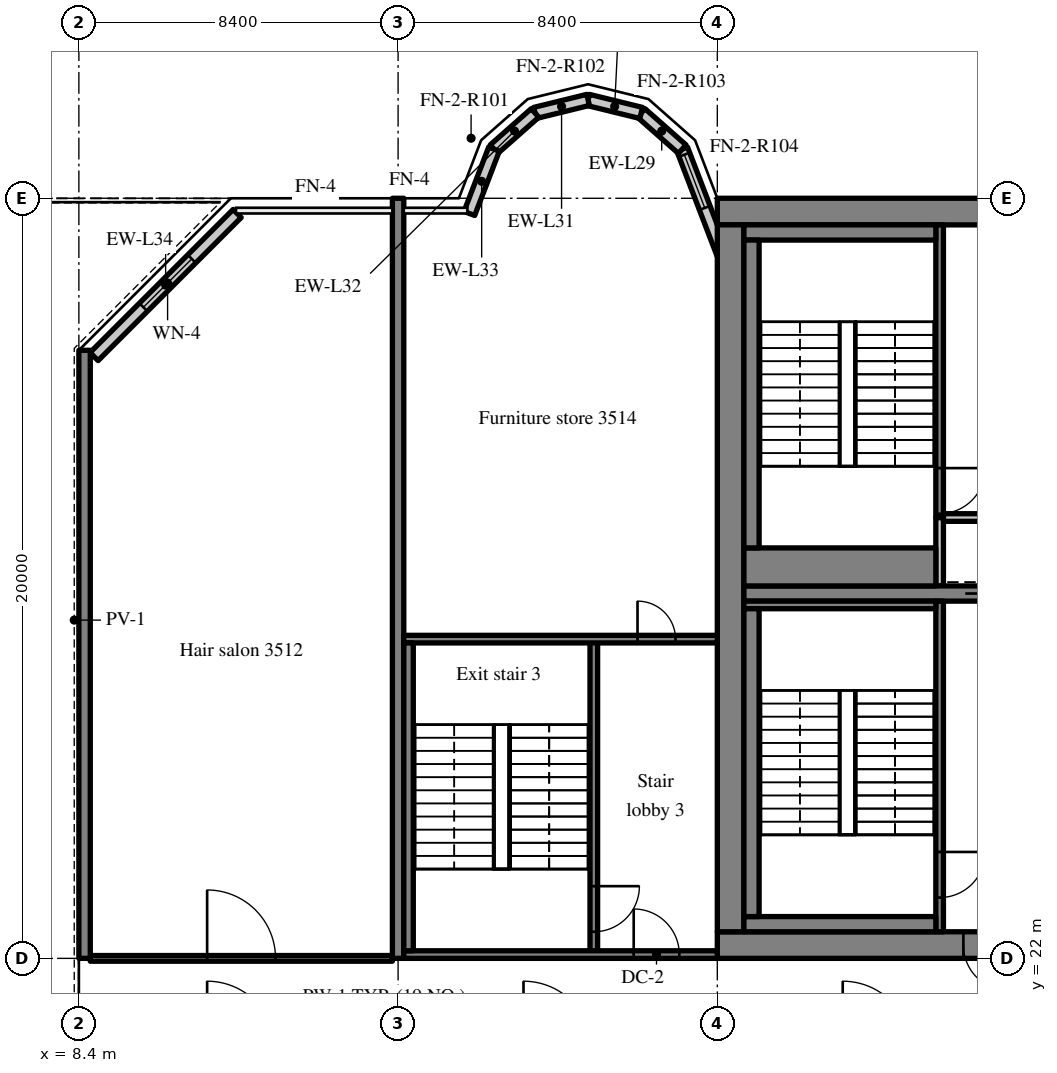
"""IFC4 building model, lengths in metres.
Left out: names, types, materials, properties, quantities, classifications, styles, units other than length and angle.
Written with IfcOpenShell. Run it as: python <this file> out.ifc"""

import sys

from ifc_helpers import new_model, si_unit, direction, frame, frame_2d, origin, place, context, subcontext, project, spatial, rectangle, extrude, source, transform, mapped, element, fill, save


model = new_model("IFC4")
c1 = context("Model", 3, precision=1e-05, world=origin(), true_north=direction((0.0, 1.0)))
c2 = subcontext(c1, "Body", "Model", "MODEL_VIEW")
j1 = project(units=[si_unit("LENGTHUNIT", "METRE"), si_unit("PLANEANGLEUNIT", "RADIAN")], contexts=[c1])
p1 = place(None, origin())
s1 = spatial("IfcSite", under=j1, at=p1, CompositionType="ELEMENT")
p2 = place(p1, origin())
s2 = spatial("IfcBuilding", under=s1, at=p2, CompositionType="ELEMENT")
p3 = place(p2, frame((0.0, 0.0, 146.2)))
s3 = spatial("IfcBuildingStorey", under=s2, at=p3, CompositionType="ELEMENT", Elevation=146.2)
m1 = source(origin(), c2, "Body", "SweptSolid", [
    extrude(rectangle(XDim=50.4, YDim=0.7, at=frame_2d((25.2, 0.0))), origin(), (0.0, 0.0, 1.0), 5.12),
])
p4 = place(p3, frame((25.2, 22.35, 0.0), z_axis=(0.0, 0.0, 1.0), x_axis=(1.0, 0.0, 0.0)))
e1 = element("IfcWall", 1, at=p4, inside=s3, PredefinedType="SHEAR", context=c2, shape_type="MappedRepresentation", body=[
    mapped(m1, transform((0.0, 0.0, 0.0), scale=1.0)),
])
m2 = source(origin(), c2, "Body", "SweptSolid", [
    extrude(rectangle(XDim=1.8, YDim=2.1, at=frame_2d((0.9, 1.05))), frame((0.0, 0.36, 0.0), z_axis=(0.0, -1.0, 0.0), x_axis=(1.0, 0.0, 0.0)), (0.0, 0.0, 1.0), 0.72),
])
p5 = place(p4, frame((15.9, 0.0, 0.0)))
e2 = element("IfcOpeningElement", 2, at=p5, cuts=e1, PredefinedType="OPENING", context=c2, shape_type="MappedRepresentation", body=[
    mapped(m2, transform((0.0, 0.0, 0.0), scale=1.0)),
])
p6 = place(p4, frame((32.7, 0.0, 0.0)))
e3 = element("IfcOpeningElement", 3, at=p6, cuts=e1, PredefinedType="OPENING", context=c2, shape_type="MappedRepresentation", body=[
    mapped(m2, transform((0.0, 0.0, 0.0), scale=1.0)),
])
m3 = source(origin(), c2, "Body", "SweptSolid", [
    extrude(rectangle(XDim=1.2, YDim=2.1, at=frame_2d((0.6, 1.05))), frame((0.0, 0.36, 0.0), z_axis=(0.0, -1.0, 0.0), x_axis=(1.0, 0.0, 0.0)), (0.0, 0.0, 1.0), 0.72),
])
p7 = place(p4, frame((6.475, 0.0, 0.0)))
e4 = element("IfcOpeningElement", 4, at=p7, cuts=e1, PredefinedType="OPENING", context=c2, shape_type="MappedRepresentation", body=[
    mapped(m3, transform((0.0, 0.0, 0.0), scale=1.0)),
])
p8 = place(p4, frame((47.875, 0.0, 0.0)))
e5 = element("IfcOpeningElement", 5, at=p8, cuts=e1, PredefinedType="OPENING", context=c2, shape_type="MappedRepresentation", body=[
    mapped(m3, transform((0.0, 0.0, 0.0), scale=1.0)),
])
p9 = place(p3, frame((25.2, 41.65, 0.0), z_axis=(0.0, 0.0, 1.0), x_axis=(1.0, 0.0, 0.0)))
e6 = element("IfcWall", 6, at=p9, inside=s3, PredefinedType="SHEAR", context=c2, shape_type="MappedRepresentation", body=[
    mapped(m1, transform((0.0, 0.0, 0.0), scale=1.0)),
])
m4 = source(origin(), c2, "Body", "SweptSolid", [
    extrude(rectangle(XDim=18.6, YDim=0.7, at=frame_2d((9.3, 0.0))), origin(), (0.0, 0.0, 1.0), 5.12),
])
p10 = place(p3, frame((25.55, 22.7, 0.0), z_axis=(0.0, 0.0, 1.0), x_axis=(0.0, 1.0, 0.0)))
e7 = element("IfcWall", 7, at=p10, inside=s3, PredefinedType="SHEAR", context=c2, shape_type="MappedRepresentation", body=[
    mapped(m4, transform((0.0, 0.0, 0.0), scale=1.0)),
])
m5 = source(origin(), c2, "Body", "SweptSolid", [
    extrude(rectangle(XDim=7.5, YDim=0.4, at=frame_2d((3.75, 0.0))), origin(), (0.0, 0.0, 1.0), 5.12),
])
p11 = place(p3, frame((25.9, 31.6, 0.0), z_axis=(0.0, 0.0, 1.0), x_axis=(1.0, 0.0, 0.0)))
e8 = element("IfcWall", 8, at=p11, inside=s3, PredefinedType="SHEAR", context=c2, shape_type="MappedRepresentation", body=[
    mapped(m5, transform((0.0, 0.0, 0.0), scale=1.0)),
])
m6 = source(origin(), c2, "Body", "SweptSolid", [
    extrude(rectangle(XDim=1.1, YDim=2.1, at=frame_2d((0.55, 1.05))), frame((0.0, 0.21, 0.0), z_axis=(0.0, -1.0, 0.0), x_axis=(1.0, 0.0, 0.0)), (0.0, 0.0, 1.0), 0.42),
])
p12 = place(p11, frame((5.825, 0.0, 0.0)))
e9 = element("IfcOpeningElement", 9, at=p12, cuts=e8, PredefinedType="OPENING", context=c2, shape_type="MappedRepresentation", body=[
    mapped(m6, transform((0.0, 0.0, 0.0), scale=1.0)),
])
m7 = source(origin(), c2, "Body", "SweptSolid", [
    extrude(rectangle(XDim=16.0, YDim=0.3, at=frame_2d((8.0, 0.0))), origin(), (0.0, 0.0, 1.0), 5.12),
])
p13 = place(p3, frame((8.55, 22.0, 0.0), z_axis=(0.0, 0.0, 1.0), x_axis=(0.0, 1.0, 0.0)))
e10 = element("IfcWall", 10, at=p13, inside=s3, PredefinedType="SHEAR", context=c2, shape_type="MappedRepresentation", body=[
    mapped(m7, transform((0.0, 0.0, 0.0), scale=1.0)),
])
m8 = source(origin(), c2, "Body", "SweptSolid", [
    extrude(rectangle(XDim=20.0, YDim=0.3, at=frame_2d((10.0, 0.0))), origin(), (0.0, 0.0, 1.0), 5.12),
])
p14 = place(p3, frame((16.8, 22.0, 0.0), z_axis=(0.0, 0.0, 1.0), x_axis=(0.0, 1.0, 0.0)))
e11 = element("IfcWall", 11, at=p14, inside=s3, PredefinedType="SHEAR", context=c2, shape_type="MappedRepresentation", body=[
    mapped(m8, transform((0.0, 0.0, 0.0), scale=1.0)),
])
m9 = source(origin(), c2, "Body", "SweptSolid", [
    extrude(rectangle(XDim=3.559, YDim=0.3, at=frame_2d((1.78, 0.0))), origin(), (0.0, 0.0, 1.0), 5.12),
])
p15 = place(p3, frame((25.55, 39.969, 0.0), z_axis=(0.0, 0.0, 1.0), x_axis=(-0.35779745313, 0.933799219604, 0.0)))
e12 = element("IfcWall", 12, at=p15, inside=s3, PredefinedType="SOLIDWALL", context=c2, shape_type="MappedRepresentation", body=[
    mapped(m9, transform((0.0, 0.0, 0.0), scale=1.0)),
])
m10 = source(origin(), c2, "Body", "SweptSolid", [
    extrude(rectangle(XDim=1.5, YDim=2.0, at=frame_2d((0.75, 1.0))), frame((0.0, 0.16, 0.0), z_axis=(0.0, -1.0, 0.0), x_axis=(1.0, 0.0, 0.0)), (0.0, 0.0, 1.0), 0.32),
])
p16 = place(p15, frame((1.903, 0.0, 0.9)))
e13 = element("IfcOpeningElement", 13, at=p16, cuts=e12, PredefinedType="OPENING", context=c2, shape_type="MappedRepresentation", body=[
    mapped(m10, transform((0.0, 0.0, 0.0), scale=1.0)),
])
m11 = source(origin(), c2, "Body", "SweptSolid", [
    extrude(rectangle(XDim=1.44, YDim=0.3, at=frame_2d((0.72, 0.0))), origin(), (0.0, 0.0, 1.0), 5.12),
])
p17 = place(p3, frame((24.277, 43.292, 0.0), z_axis=(0.0, 0.0, 1.0), x_axis=(-0.749649827867, 0.661834673902, 0.0)))
e14 = element("IfcWall", 14, at=p17, inside=s3, PredefinedType="SOLIDWALL", context=c2, shape_type="MappedRepresentation", body=[
    mapped(m11, transform((0.0, 0.0, 0.0), scale=1.0)),
])
m12 = source(origin(), c2, "Body", "SweptSolid", [
    extrude(rectangle(XDim=1.438, YDim=0.3, at=frame_2d((0.719, 0.0))), origin(), (0.0, 0.0, 1.0), 5.12),
])
p18 = place(p3, frame((23.197, 44.245, 0.0), z_axis=(0.0, 0.0, 1.0), x_axis=(-0.971152283879, 0.238460146601, 0.0)))
e15 = element("IfcWall", 15, at=p18, inside=s3, PredefinedType="SOLIDWALL", context=c2, shape_type="MappedRepresentation", body=[
    mapped(m12, transform((0.0, 0.0, 0.0), scale=1.0)),
])
m13 = source(origin(), c2, "Body", "SweptSolid", [
    extrude(rectangle(XDim=1.439, YDim=0.3, at=frame_2d((0.719, 0.0))), origin(), (0.0, 0.0, 1.0), 5.12),
])
p19 = place(p3, frame((21.8, 44.588, 0.0), z_axis=(0.0, 0.0, 1.0), x_axis=(-0.971161932466, -0.238420848351, 0.0)))
e16 = element("IfcWall", 16, at=p19, inside=s3, PredefinedType="SOLIDWALL", context=c2, shape_type="MappedRepresentation", body=[
    mapped(m13, transform((0.0, 0.0, 0.0), scale=1.0)),
])
m14 = source(origin(), c2, "Body", "SweptSolid", [
    extrude(rectangle(XDim=1.44, YDim=0.3, at=frame_2d((0.72, 0.0))), origin(), (0.0, 0.0, 1.0), 5.12),
])
p20 = place(p3, frame((20.403, 44.245, 0.0), z_axis=(0.0, 0.0, 1.0), x_axis=(-0.74957555648, -0.661918790432, 0.0)))
e17 = element("IfcWall", 17, at=p20, inside=s3, PredefinedType="SOLIDWALL", context=c2, shape_type="MappedRepresentation", body=[
    mapped(m14, transform((0.0, 0.0, 0.0), scale=1.0)),
])
m15 = source(origin(), c2, "Body", "SweptSolid", [
    extrude(rectangle(XDim=1.812, YDim=0.3, at=frame_2d((0.906, 0.0))), origin(), (0.0, 0.0, 1.0), 5.12),
])
p21 = place(p3, frame((19.323, 43.292, 0.0), z_axis=(0.0, 0.0, 1.0), x_axis=(-0.357877270961, -0.93376863244, 0.0)))
e18 = element("IfcWall", 18, at=p21, inside=s3, PredefinedType="SOLIDWALL", context=c2, shape_type="MappedRepresentation", body=[
    mapped(m15, transform((0.0, 0.0, 0.0), scale=1.0)),
])
m16 = source(origin(), c2, "Body", "SweptSolid", [
    extrude(rectangle(XDim=5.326, YDim=0.3, at=frame_2d((2.663, 0.0))), origin(), (0.0, 0.0, 1.0), 5.12),
])
p22 = place(p3, frame((12.566, 41.6, 0.0), z_axis=(0.0, 0.0, 1.0), x_axis=(-0.707083859269, -0.707129702361, 0.0)))
e19 = element("IfcWall", 19, at=p22, inside=s3, PredefinedType="SOLIDWALL", context=c2, shape_type="MappedRepresentation", body=[
    mapped(m16, transform((0.0, 0.0, 0.0), scale=1.0)),
])
m17 = source(origin(), c2, "Body", "SweptSolid", [
    extrude(rectangle(XDim=1.8, YDim=1.5, at=frame_2d((0.9, 0.75))), frame((0.0, 0.16, 0.0), z_axis=(0.0, -1.0, 0.0), x_axis=(1.0, 0.0, 0.0)), (0.0, 0.0, 1.0), 0.32),
])
p23 = place(p22, frame((1.689, 0.0, 0.9)))
e20 = element("IfcOpeningElement", 20, at=p23, cuts=e19, PredefinedType="OPENING", context=c2, shape_type="MappedRepresentation", body=[
    mapped(m17, transform((0.0, 0.0, 0.0), scale=1.0)),
])
m18 = source(origin(), c2, "Body", "SweptSolid", [
    extrude(rectangle(XDim=8.7, YDim=0.2, at=frame_2d((4.35, 0.0))), origin(), (0.0, 0.0, 1.0), 5.12),
])
p24 = place(p3, frame((31.05, 22.7, 0.0), z_axis=(0.0, 0.0, 1.0), x_axis=(0.0, 1.0, 0.0)))
e21 = element("IfcWall", 21, at=p24, inside=s3, PredefinedType="SOLIDWALL", context=c2, shape_type="MappedRepresentation", body=[
    mapped(m18, transform((0.0, 0.0, 0.0), scale=1.0)),
])
m19 = source(origin(), c2, "Body", "SweptSolid", [
    extrude(rectangle(XDim=1.2, YDim=2.1, at=frame_2d((0.6, 1.05))), frame((0.0, 0.11, 0.0), z_axis=(0.0, -1.0, 0.0), x_axis=(1.0, 0.0, 0.0)), (0.0, 0.0, 1.0), 0.22),
])
p25 = place(p24, frame((0.9, 0.0, 0.0)))
e22 = element("IfcOpeningElement", 22, at=p25, cuts=e21, PredefinedType="OPENING", context=c2, shape_type="MappedRepresentation", body=[
    mapped(m19, transform((0.0, 0.0, 0.0), scale=1.0)),
])
m20 = source(origin(), c2, "Body", "SweptSolid", [
    extrude(rectangle(XDim=1.8, YDim=0.2, at=frame_2d((0.9, 0.0))), origin(), (0.0, 0.0, 1.0), 5.12),
])
p26 = place(p3, frame((31.05, 31.8, 0.0), z_axis=(0.0, 0.0, 1.0), x_axis=(0.0, 1.0, 0.0)))
e23 = element("IfcWall", 23, at=p26, inside=s3, PredefinedType="SOLIDWALL", context=c2, shape_type="MappedRepresentation", body=[
    mapped(m20, transform((0.0, 0.0, 0.0), scale=1.0)),
])
m21 = source(origin(), c2, "Body", "SweptSolid", [
    extrude(rectangle(XDim=2.25, YDim=0.2, at=frame_2d((1.125, 0.0))), origin(), (0.0, 0.0, 1.0), 5.12),
])
p27 = place(p3, frame((31.15, 33.6, 0.0), z_axis=(0.0, 0.0, 1.0), x_axis=(1.0, 0.0, 0.0)))
e24 = element("IfcWall", 24, at=p27, inside=s3, PredefinedType="SOLIDWALL", context=c2, shape_type="MappedRepresentation", body=[
    mapped(m21, transform((0.0, 0.0, 0.0), scale=1.0)),
])
m22 = source(origin(), c2, "Body", "SweptSolid", [
    extrude(rectangle(XDim=7.7, YDim=0.2, at=frame_2d((3.85, 0.0))), origin(), (0.0, 0.0, 1.0), 5.12),
])
p28 = place(p3, frame((31.05, 33.6, 0.0), z_axis=(0.0, 0.0, 1.0), x_axis=(0.0, 1.0, 0.0)))
e25 = element("IfcWall", 25, at=p28, inside=s3, PredefinedType="SOLIDWALL", context=c2, shape_type="MappedRepresentation", body=[
    mapped(m22, transform((0.0, 0.0, 0.0), scale=1.0)),
])
p29 = place(p28, frame((0.1, 0.0, 0.0)))
e26 = element("IfcOpeningElement", 26, at=p29, cuts=e25, PredefinedType="OPENING", context=c2, shape_type="MappedRepresentation", body=[
    mapped(m19, transform((0.0, 0.0, 0.0), scale=1.0)),
])
m23 = source(origin(), c2, "Body", "SweptSolid", [
    extrude(rectangle(XDim=8.3, YDim=0.2, at=frame_2d((4.15, 0.0))), origin(), (0.0, 0.0, 1.0), 5.12),
])
p30 = place(p3, frame((21.95, 22.1, 0.0), z_axis=(0.0, 0.0, 1.0), x_axis=(0.0, 1.0, 0.0)))
e27 = element("IfcWall", 27, at=p30, inside=s3, PredefinedType="SOLIDWALL", context=c2, shape_type="MappedRepresentation", body=[
    mapped(m23, transform((0.0, 0.0, 0.0), scale=1.0)),
])
p31 = place(p30, frame((0.6, 0.0, 0.0)))
e28 = element("IfcOpeningElement", 28, at=p31, cuts=e27, PredefinedType="OPENING", context=c2, shape_type="MappedRepresentation", body=[
    mapped(m19, transform((0.0, 0.0, 0.0), scale=1.0)),
])
m24 = source(origin(), c2, "Body", "SweptSolid", [
    extrude(rectangle(XDim=8.25, YDim=0.2, at=frame_2d((4.125, 0.0))), origin(), (0.0, 0.0, 1.0), 5.12),
])
p32 = place(p3, frame((16.95, 22.1, 0.0), z_axis=(0.0, 0.0, 1.0), x_axis=(1.0, 0.0, 0.0)))
e29 = element("IfcWall", 29, at=p32, inside=s3, PredefinedType="SOLIDWALL", context=c2, shape_type="MappedRepresentation", body=[
    mapped(m24, transform((0.0, 0.0, 0.0), scale=1.0)),
])
p33 = place(p32, frame((6.05, 0.0, 0.0)))
e30 = element("IfcOpeningElement", 30, at=p33, cuts=e29, PredefinedType="OPENING", context=c2, shape_type="MappedRepresentation", body=[
    mapped(m19, transform((0.0, 0.0, 0.0), scale=1.0)),
])
p34 = place(p3, frame((16.95, 30.4, 0.0), z_axis=(0.0, 0.0, 1.0), x_axis=(1.0, 0.0, 0.0)))
e31 = element("IfcWall", 31, at=p34, inside=s3, PredefinedType="SOLIDWALL", context=c2, shape_type="MappedRepresentation", body=[
    mapped(m24, transform((0.0, 0.0, 0.0), scale=1.0)),
])
m25 = source(origin(), c2, "Body", "SweptSolid", [
    extrude(rectangle(XDim=1.0, YDim=2.1, at=frame_2d((0.5, 1.05))), frame((0.0, 0.11, 0.0), z_axis=(0.0, -1.0, 0.0), x_axis=(1.0, 0.0, 0.0)), (0.0, 0.0, 1.0), 0.22),
])
p35 = place(p34, frame((6.15, 0.0, 0.0)))
e32 = element("IfcOpeningElement", 32, at=p35, cuts=e31, PredefinedType="OPENING", context=c2, shape_type="MappedRepresentation", body=[
    mapped(m25, transform((0.0, 0.0, 0.0), scale=1.0)),
])
m26 = source(origin(), c2, "Body", "SweptSolid", [
    extrude(rectangle(XDim=5.05, YDim=0.4, at=frame_2d((2.525, 0.0))), origin(), (0.0, 0.0, 1.0), 5.12),
])
p36 = place(p3, frame((25.9, 22.9, 0.0), z_axis=(0.0, 0.0, 1.0), x_axis=(1.0, 0.0, 0.0)))
e33 = element("IfcWall", 33, at=p36, inside=s3, PredefinedType="SOLIDWALL", context=c2, shape_type="MappedRepresentation", body=[
    mapped(m26, transform((0.0, 0.0, 0.0), scale=1.0)),
])
m27 = source(origin(), c2, "Body", "SweptSolid", [
    extrude(rectangle(XDim=5.05, YDim=0.2, at=frame_2d((2.525, 0.0))), origin(), (0.0, 0.0, 1.0), 5.12),
])
p37 = place(p3, frame((25.9, 31.3, 0.0), z_axis=(0.0, 0.0, 1.0), x_axis=(1.0, 0.0, 0.0)))
e34 = element("IfcWall", 34, at=p37, inside=s3, PredefinedType="SOLIDWALL", context=c2, shape_type="MappedRepresentation", body=[
    mapped(m27, transform((0.0, 0.0, 0.0), scale=1.0)),
])
m28 = source(origin(), c2, "Body", "SweptSolid", [
    extrude(rectangle(XDim=8.1, YDim=0.4, at=frame_2d((4.05, 0.0))), origin(), (0.0, 0.0, 1.0), 5.12),
])
p38 = place(p3, frame((26.1, 23.1, 0.0), z_axis=(0.0, 0.0, 1.0), x_axis=(0.0, 1.0, 0.0)))
e35 = element("IfcWall", 35, at=p38, inside=s3, PredefinedType="SOLIDWALL", context=c2, shape_type="MappedRepresentation", body=[
    mapped(m28, transform((0.0, 0.0, 0.0), scale=1.0)),
])
m29 = source(origin(), c2, "Body", "SweptSolid", [
    extrude(rectangle(XDim=8.1, YDim=0.25, at=frame_2d((4.05, 0.0))), origin(), (0.0, 0.0, 1.0), 5.12),
])
p39 = place(p3, frame((17.075, 22.2, 0.0), z_axis=(0.0, 0.0, 1.0), x_axis=(0.0, 1.0, 0.0)))
e36 = element("IfcWall", 36, at=p39, inside=s3, PredefinedType="SOLIDWALL", context=c2, shape_type="MappedRepresentation", body=[
    mapped(m29, transform((0.0, 0.0, 0.0), scale=1.0)),
])
p40 = place(p3, frame((25.9, 41.1, 0.0), z_axis=(0.0, 0.0, 1.0), x_axis=(1.0, 0.0, 0.0)))
e37 = element("IfcWall", 37, at=p40, inside=s3, PredefinedType="SOLIDWALL", context=c2, shape_type="MappedRepresentation", body=[
    mapped(m26, transform((0.0, 0.0, 0.0), scale=1.0)),
])
m30 = source(origin(), c2, "Body", "SweptSolid", [
    extrude(rectangle(XDim=5.05, YDim=1.0, at=frame_2d((2.525, 0.0))), origin(), (0.0, 0.0, 1.0), 5.12),
])
p41 = place(p3, frame((25.9, 32.3, 0.0), z_axis=(0.0, 0.0, 1.0), x_axis=(1.0, 0.0, 0.0)))
e38 = element("IfcWall", 38, at=p41, inside=s3, PredefinedType="SOLIDWALL", context=c2, shape_type="MappedRepresentation", body=[
    mapped(m30, transform((0.0, 0.0, 0.0), scale=1.0)),
])
p42 = place(p3, frame((26.1, 32.8, 0.0), z_axis=(0.0, 0.0, 1.0), x_axis=(0.0, 1.0, 0.0)))
e39 = element("IfcWall", 39, at=p42, inside=s3, PredefinedType="SOLIDWALL", context=c2, shape_type="MappedRepresentation", body=[
    mapped(m28, transform((0.0, 0.0, 0.0), scale=1.0)),
])
m31 = source(origin(), c2, "Body", "SweptSolid", [
    extrude(rectangle(XDim=7.95, YDim=0.15, at=frame_2d((3.975, 0.0))), origin(), (0.0, 0.0, 1.0), 4.42),
])
p43 = place(p3, frame((8.7, 22.0, 0.0), z_axis=(0.0, 0.0, 1.0), x_axis=(1.0, 0.0, 0.0)))
e40 = element("IfcWall", 40, at=p43, inside=s3, PredefinedType="PARTITIONING", context=c2, shape_type="MappedRepresentation", body=[
    mapped(m31, transform((0.0, 0.0, 0.0), scale=1.0)),
])
m32 = source(origin(), c2, "Body", "SweptSolid", [
    extrude(rectangle(XDim=1.8, YDim=2.1, at=frame_2d((0.9, 1.05))), frame((0.0, 0.085, 0.0), z_axis=(0.0, -1.0, 0.0), x_axis=(1.0, 0.0, 0.0)), (0.0, 0.0, 1.0), 0.17),
])
p44 = place(p43, frame((3.075, 0.0, 0.0)))
e41 = element("IfcOpeningElement", 41, at=p44, cuts=e40, PredefinedType="OPENING", context=c2, shape_type="MappedRepresentation", body=[
    mapped(m32, transform((0.0, 0.0, 0.0), scale=1.0)),
])
m33 = source(origin(), c2, "Body", "SweptSolid", [
    extrude(rectangle(XDim=1.5, YDim=2.0, at=frame_2d((0.75, 1.0))), frame((0.0, 0.03, 0.0), z_axis=(0.0, -1.0, 0.0), x_axis=(1.0, 0.0, 0.0)), (0.0, 0.0, 1.0), 0.06),
])
p45 = place(p16, origin())
e42 = element("IfcWindow", 42, at=p45, inside=s3, PartitioningType="SINGLE_PANEL", PredefinedType="WINDOW", context=c2, shape_type="MappedRepresentation", body=[
    mapped(m33, transform((0.0, 0.0, 0.0), scale=1.0)),
])
fill(e13, e42)
m34 = source(origin(), c2, "Body", "SweptSolid", [
    extrude(rectangle(XDim=1.8, YDim=1.5, at=frame_2d((0.9, 0.75))), frame((0.0, 0.03, 0.0), z_axis=(0.0, -1.0, 0.0), x_axis=(1.0, 0.0, 0.0)), (0.0, 0.0, 1.0), 0.06),
])
p46 = place(p23, origin())
e43 = element("IfcWindow", 43, at=p46, inside=s3, PartitioningType="SINGLE_PANEL", PredefinedType="WINDOW", context=c2, shape_type="MappedRepresentation", body=[
    mapped(m34, transform((0.0, 0.0, 0.0), scale=1.0)),
])
fill(e20, e43)
m35 = source(origin(), c2, "Body", "SweptSolid", [
    extrude(rectangle(XDim=1.2, YDim=2.1, at=frame_2d((0.6, 1.05))), frame((0.0, 0.025, 0.0), z_axis=(0.0, -1.0, 0.0), x_axis=(1.0, 0.0, 0.0)), (0.0, 0.0, 1.0), 0.05),
])
p47 = place(p25, origin())
e44 = element("IfcDoor", 44, at=p47, inside=s3, OperationType="SINGLE_SWING_RIGHT", PredefinedType="DOOR", context=c2, shape_type="MappedRepresentation", body=[
    mapped(m35, transform((0.0, 0.0, 0.0), scale=1.0)),
])
fill(e22, e44)
m36 = source(origin(), c2, "Body", "SweptSolid", [
    extrude(rectangle(XDim=1.2, YDim=2.1, at=frame_2d((0.6, 1.05))), frame((0.0, 0.275, 0.0), z_axis=(0.0, -1.0, 0.0), x_axis=(1.0, 0.0, 0.0)), (0.0, 0.0, 1.0), 0.05),
])
p48 = place(p7, origin())
e45 = element("IfcDoor", 45, at=p48, inside=s3, OperationType="SINGLE_SWING_RIGHT", PredefinedType="DOOR", context=c2, shape_type="MappedRepresentation", body=[
    mapped(m36, transform((0.0, 0.0, 0.0), scale=1.0)),
])
fill(e4, e45)
m37 = source(origin(), c2, "Body", "SweptSolid", [
    extrude(rectangle(XDim=1.1, YDim=2.1, at=frame_2d((0.55, 1.05))), frame((0.0, 0.025, 0.0), z_axis=(0.0, -1.0, 0.0), x_axis=(1.0, 0.0, 0.0)), (0.0, 0.0, 1.0), 0.05),
])
p49 = place(p12, origin())
e46 = element("IfcDoor", 46, at=p49, inside=s3, OperationType="SLIDING_TO_RIGHT", PredefinedType="DOOR", context=c2, shape_type="MappedRepresentation", body=[
    mapped(m37, transform((0.0, 0.0, 0.0), scale=1.0)),
])
fill(e9, e46)
p50 = place(p29, origin())
e47 = element("IfcDoor", 47, at=p50, inside=s3, OperationType="SINGLE_SWING_RIGHT", PredefinedType="DOOR", context=c2, shape_type="MappedRepresentation", body=[
    mapped(m35, transform((0.0, 0.0, 0.0), scale=1.0)),
])
fill(e26, e47)
p51 = place(p31, origin())
e48 = element("IfcDoor", 48, at=p51, inside=s3, OperationType="SINGLE_SWING_RIGHT", PredefinedType="DOOR", context=c2, shape_type="MappedRepresentation", body=[
    mapped(m35, transform((0.0, 0.0, 0.0), scale=1.0)),
])
fill(e28, e48)
p52 = place(p33, origin())
e49 = element("IfcDoor", 49, at=p52, inside=s3, OperationType="SINGLE_SWING_LEFT", PredefinedType="DOOR", context=c2, shape_type="MappedRepresentation", body=[
    mapped(m35, transform((0.0, 0.0, 0.0), scale=1.0)),
])
fill(e30, e49)
m38 = source(origin(), c2, "Body", "SweptSolid", [
    extrude(rectangle(XDim=1.0, YDim=2.1, at=frame_2d((0.5, 1.05))), frame((0.0, 0.025, 0.0), z_axis=(0.0, -1.0, 0.0), x_axis=(1.0, 0.0, 0.0)), (0.0, 0.0, 1.0), 0.05),
])
p53 = place(p35, origin())
e50 = element("IfcDoor", 50, at=p53, inside=s3, OperationType="SINGLE_SWING_LEFT", PredefinedType="DOOR", context=c2, shape_type="MappedRepresentation", body=[
    mapped(m38, transform((0.0, 0.0, 0.0), scale=1.0)),
])
fill(e32, e50)
m39 = source(origin(), c2, "Body", "SweptSolid", [
    extrude(rectangle(XDim=1.8, YDim=2.1, at=frame_2d((0.9, 1.05))), frame((0.0, 0.025, 0.0), z_axis=(0.0, -1.0, 0.0), x_axis=(1.0, 0.0, 0.0)), (0.0, 0.0, 1.0), 0.05),
])
p54 = place(p44, origin())
e51 = element("IfcDoor", 51, at=p54, inside=s3, OperationType="DOUBLE_DOOR_SINGLE_SWING", PredefinedType="DOOR", context=c2, shape_type="MappedRepresentation", body=[
    mapped(m39, transform((0.0, 0.0, 0.0), scale=1.0)),
])
fill(e41, e51)
save(model, sys.argv[1])
